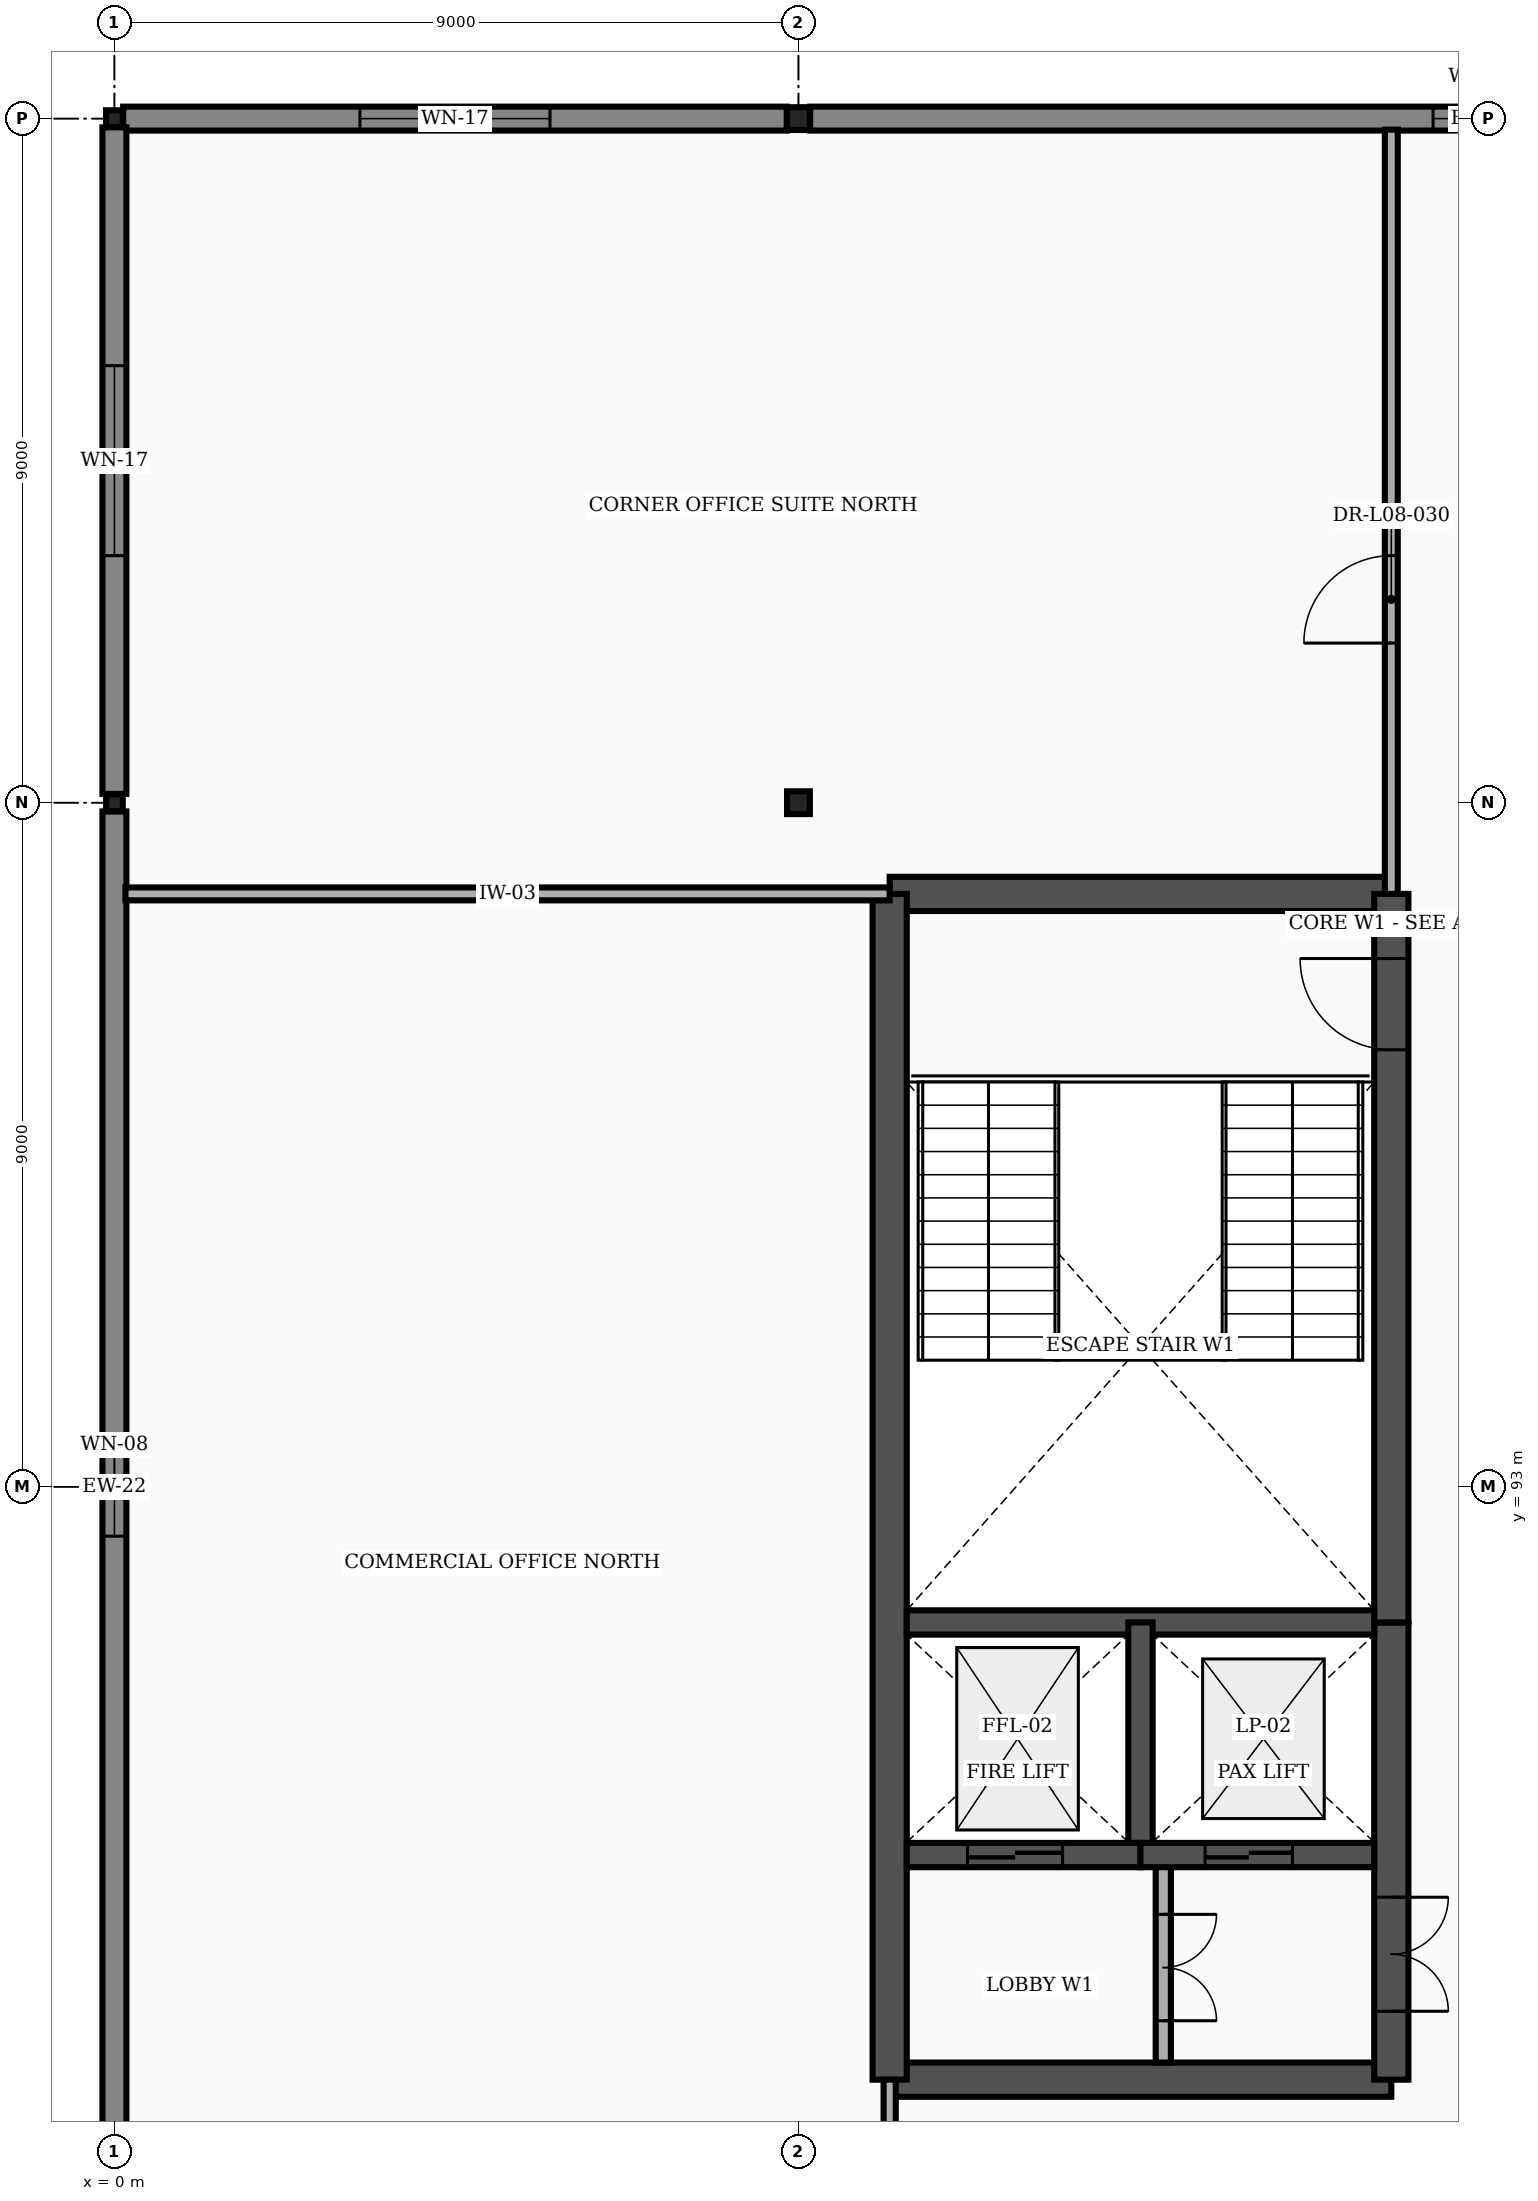
"""IFC4 building model, lengths in metres.
Left out: names, types, materials, properties, quantities, classifications, styles, units other than length and angle.
Written with IfcOpenShell. Run it as: python <this file> out.ifc"""

import sys

from ifc_helpers import new_model, si_unit, direction, frame, frame_2d, origin, origin_2d, place, context, subcontext, project, spatial, rectangle, hollow_rectangle, extrude, element, fill, save


model = new_model("IFC4")
c1 = context("Model", 3, precision=1e-05, world=origin(), true_north=direction((0.0, 1.0)))
c2 = subcontext(c1, "Body", "Model", "MODEL_VIEW")
j1 = project(units=[si_unit("LENGTHUNIT", "METRE"), si_unit("PLANEANGLEUNIT", "RADIAN")], contexts=[c1])
p1 = place(None, origin())
s1 = spatial("IfcSite", under=j1, at=p1, CompositionType="ELEMENT")
p2 = place(p1, origin())
s2 = spatial("IfcBuilding", under=s1, at=p2, CompositionType="ELEMENT")
p3 = place(p2, frame((0.0, 0.0, 37.8)))
s3 = spatial("IfcBuildingStorey", under=s2, at=p3, CompositionType="ELEMENT", Elevation=37.8)
for number, where, z_axis, x_axis in (
    (1, (0.0, 102.0, 0.0), (0.0, 0.0, 1.0), (1.0, 0.0, 0.0)),
    (2, (0.0, 111.0, 0.0), (0.0, 0.0, 1.0), (1.0, 0.0, 0.0)),
):
    element("IfcColumn", number, at=place(p3, frame(where, z_axis=z_axis, x_axis=x_axis)), inside=s3, PredefinedType="COLUMN", context=c2, shape_type="SweptSolid", body=[
        extrude(hollow_rectangle(XDim=0.22, YDim=0.22, WallThickness=0.01, at=origin_2d()), origin(), (0.0, 0.0, 1.0), 3.9),
    ])
for number, where, z_axis, x_axis in (
    (3, (9.0, 102.0, 0.0), (0.0, 0.0, 1.0), (1.0, 0.0, 0.0)),
    (4, (9.0, 111.0, 0.0), (0.0, 0.0, 1.0), (1.0, 0.0, 0.0)),
):
    element("IfcColumn", number, at=place(p3, frame(where, z_axis=z_axis, x_axis=x_axis)), inside=s3, PredefinedType="COLUMN", context=c2, shape_type="SweptSolid", body=[
        extrude(hollow_rectangle(XDim=0.3, YDim=0.3, WallThickness=0.012, at=origin_2d()), origin(), (0.0, 0.0, 1.0), 3.9),
    ])
p4 = place(p3, frame((0.115, 111.0, 0.0), z_axis=(0.0, 0.0, 1.0), x_axis=(1.0, 0.0, 0.0)))
e5 = element("IfcWall", 5, at=p4, inside=s3, PredefinedType="STANDARD", context=c2, shape_type="SweptSolid", body=[
    extrude(rectangle(XDim=8.731, YDim=0.315, at=frame_2d((4.366, 0.0))), origin(), (0.0, 0.0, 1.0), 3.565),
])
p5 = place(p4, frame((3.115, 0.0, 0.7)))
e6 = element("IfcOpeningElement", 6, at=p5, cuts=e5, PredefinedType="OPENING", context=c2, shape_type="SweptSolid", body=[
    extrude(rectangle(XDim=2.5, YDim=1.9, at=frame_2d((1.25, 0.95))), frame((0.0, 0.169, 0.0), z_axis=(0.0, -1.0, 0.0), x_axis=(1.0, 0.0, 0.0)), (0.0, 0.0, 1.0), 0.339),
])
p6 = place(p3, frame((9.154, 111.0, 0.0), z_axis=(0.0, 0.0, 1.0), x_axis=(1.0, 0.0, 0.0)))
e7 = element("IfcWall", 7, at=p6, inside=s3, PredefinedType="STANDARD", context=c2, shape_type="SweptSolid", body=[
    extrude(rectangle(XDim=17.692, YDim=0.315, at=frame_2d((8.846, 0.0))), origin(), (0.0, 0.0, 1.0), 2.803),
])
p7 = place(p6, frame((8.196, 0.0, 0.7)))
e8 = element("IfcOpeningElement", 8, at=p7, cuts=e7, PredefinedType="OPENING", context=c2, shape_type="SweptSolid", body=[
    extrude(rectangle(XDim=1.3, YDim=1.9, at=frame_2d((0.65, 0.95))), frame((0.0, 0.169, 0.0), z_axis=(0.0, -1.0, 0.0), x_axis=(1.0, 0.0, 0.0)), (0.0, 0.0, 1.0), 0.339),
])
p8 = place(p3, frame((0.0, 84.115, 0.0), z_axis=(0.0, 0.0, 1.0), x_axis=(0.0, 1.0, 0.0)))
e9 = element("IfcWall", 9, at=p8, inside=s3, PredefinedType="STANDARD", context=c2, shape_type="SweptSolid", body=[
    extrude(rectangle(XDim=17.77, YDim=0.315, at=frame_2d((8.885, 0.0))), origin(), (0.0, 0.0, 1.0), 2.953),
])
p9 = place(p8, frame((8.235, 0.0, 0.7)))
e10 = element("IfcOpeningElement", 10, at=p9, cuts=e9, PredefinedType="OPENING", context=c2, shape_type="SweptSolid", body=[
    extrude(rectangle(XDim=1.3, YDim=1.9, at=frame_2d((0.65, 0.95))), frame((0.0, 0.169, 0.0), z_axis=(0.0, -1.0, 0.0), x_axis=(1.0, 0.0, 0.0)), (0.0, 0.0, 1.0), 0.339),
])
p10 = place(p3, frame((0.0, 102.115, 0.0), z_axis=(0.0, 0.0, 1.0), x_axis=(0.0, 1.0, 0.0)))
e11 = element("IfcWall", 11, at=p10, inside=s3, PredefinedType="STANDARD", context=c2, shape_type="SweptSolid", body=[
    extrude(rectangle(XDim=8.77, YDim=0.315, at=frame_2d((4.385, 0.0))), origin(), (0.0, 0.0, 1.0), 3.565),
])
p11 = place(p10, frame((3.135, 0.0, 0.7)))
e12 = element("IfcOpeningElement", 12, at=p11, cuts=e11, PredefinedType="OPENING", context=c2, shape_type="SweptSolid", body=[
    extrude(rectangle(XDim=2.5, YDim=1.9, at=frame_2d((1.25, 0.95))), frame((0.0, 0.169, 0.0), z_axis=(0.0, -1.0, 0.0), x_axis=(1.0, 0.0, 0.0)), (0.0, 0.0, 1.0), 0.339),
])
for number, where, z_axis, x_axis in (
    (13, (10.2, 85.2, 0.0), (0.0, 0.0, 1.0), (1.0, 0.0, 0.0)),
    (14, (10.2, 100.8, 0.0), (0.0, 0.0, 1.0), (1.0, 0.0, 0.0)),
):
    element("IfcWall", number, at=place(p3, frame(where, z_axis=z_axis, x_axis=x_axis)), inside=s3, PredefinedType="SHEAR", context=c2, shape_type="SweptSolid", body=[
        extrude(rectangle(XDim=6.6, YDim=0.45, at=frame_2d((3.3, 0.0))), origin(), (0.0, 0.0, 1.0), 3.565),
    ])
p12 = place(p3, frame((10.2, 85.2, 0.0), z_axis=(0.0, 0.0, 1.0), x_axis=(0.0, 1.0, 0.0)))
e15 = element("IfcWall", 15, at=p12, inside=s3, PredefinedType="SHEAR", context=c2, shape_type="SweptSolid", body=[
    extrude(rectangle(XDim=15.6, YDim=0.45, at=frame_2d((7.8, 0.0))), origin(), (0.0, 0.0, 1.0), 3.565),
])
p13 = place(p3, frame((16.8, 85.2, 0.0), z_axis=(0.0, 0.0, 1.0), x_axis=(0.0, 1.0, 0.0)))
e16 = element("IfcWall", 16, at=p13, inside=s3, PredefinedType="SHEAR", context=c2, shape_type="SweptSolid", body=[
    extrude(rectangle(XDim=6.015, YDim=0.45, at=frame_2d((3.008, 0.0))), origin(), (0.0, 0.0, 1.0), 3.565),
])
p14 = place(p13, frame((0.9, 0.0, 0.0)))
e17 = element("IfcOpeningElement", 17, at=p14, cuts=e16, PredefinedType="OPENING", context=c2, shape_type="SweptSolid", body=[
    extrude(rectangle(XDim=1.5, YDim=2.2, at=frame_2d((0.75, 1.1))), frame((0.0, 0.237, 0.0), z_axis=(0.0, -1.0, 0.0), x_axis=(1.0, 0.0, 0.0)), (0.0, 0.0, 1.0), 0.474),
])
p15 = place(p3, frame((16.8, 91.215, 0.0), z_axis=(0.0, 0.0, 1.0), x_axis=(0.0, 1.0, 0.0)))
e18 = element("IfcWall", 18, at=p15, inside=s3, PredefinedType="SHEAR", context=c2, shape_type="SweptSolid", body=[
    extrude(rectangle(XDim=9.585, YDim=0.45, at=frame_2d((4.792, 0.0))), origin(), (0.0, 0.0, 1.0), 3.565),
])
p16 = place(p15, frame((7.535, 0.0, 0.0)))
e19 = element("IfcOpeningElement", 19, at=p16, cuts=e18, PredefinedType="OPENING", context=c2, shape_type="SweptSolid", body=[
    extrude(rectangle(XDim=1.2, YDim=2.2, at=frame_2d((0.6, 1.1))), frame((0.0, 0.237, 0.0), z_axis=(0.0, -1.0, 0.0), x_axis=(1.0, 0.0, 0.0)), (0.0, 0.0, 1.0), 0.474),
])
p17 = place(p3, frame((10.425, 91.215, 0.0), z_axis=(0.0, 0.0, 1.0), x_axis=(1.0, 0.0, 0.0)))
e20 = element("IfcWall", 20, at=p17, inside=s3, PredefinedType="SHEAR", context=c2, shape_type="SweptSolid", body=[
    extrude(rectangle(XDim=6.15, YDim=0.32, at=frame_2d((3.075, 0.0))), origin(), (0.0, 0.0, 1.0), 3.565),
])
p18 = place(p3, frame((13.5, 88.155, 0.0), z_axis=(0.0, 0.0, 1.0), x_axis=(0.0, 1.0, 0.0)))
e21 = element("IfcWall", 21, at=p18, inside=s3, PredefinedType="SHEAR", context=c2, shape_type="SweptSolid", body=[
    extrude(rectangle(XDim=3.06, YDim=0.32, at=frame_2d((1.53, 0.0))), origin(), (0.0, 0.0, 1.0), 3.565),
])
p19 = place(p3, frame((13.8, 85.425, 0.0), z_axis=(0.0, 0.0, 1.0), x_axis=(0.0, 1.0, 0.0)))
e22 = element("IfcWall", 22, at=p19, inside=s3, PredefinedType="PARTITIONING", context=c2, shape_type="SweptSolid", body=[
    extrude(rectangle(XDim=2.73, YDim=0.2, at=frame_2d((1.365, 0.0))), origin(), (0.0, 0.0, 1.0), 3.565),
])
p20 = place(p19, frame((0.55, 0.0, 0.0)))
e23 = element("IfcOpeningElement", 23, at=p20, cuts=e22, PredefinedType="OPENING", context=c2, shape_type="SweptSolid", body=[
    extrude(rectangle(XDim=1.4, YDim=2.25, at=frame_2d((0.7, 1.125))), frame((0.0, 0.112, 0.0), z_axis=(0.0, -1.0, 0.0), x_axis=(1.0, 0.0, 0.0)), (0.0, 0.0, 1.0), 0.224),
])
p21 = place(p3, frame((10.425, 88.155, 0.0), z_axis=(0.0, 0.0, 1.0), x_axis=(1.0, 0.0, 0.0)))
e24 = element("IfcWall", 24, at=p21, inside=s3, PredefinedType="SHEAR", context=c2, shape_type="SweptSolid", body=[
    extrude(rectangle(XDim=3.075, YDim=0.32, at=frame_2d((1.538, 0.0))), origin(), (0.0, 0.0, 1.0), 3.565),
])
p22 = place(p21, frame((0.8, 0.0, 0.0)))
e25 = element("IfcOpeningElement", 25, at=p22, cuts=e24, PredefinedType="OPENING", context=c2, shape_type="SweptSolid", body=[
    extrude(rectangle(XDim=1.25, YDim=2.25, at=frame_2d((0.625, 1.125))), frame((0.0, 0.172, 0.0), z_axis=(0.0, -1.0, 0.0), x_axis=(1.0, 0.0, 0.0)), (0.0, 0.0, 1.0), 0.344),
])
p23 = place(p3, frame((13.5, 88.155, 0.0), z_axis=(0.0, 0.0, 1.0), x_axis=(1.0, 0.0, 0.0)))
e26 = element("IfcWall", 26, at=p23, inside=s3, PredefinedType="SHEAR", context=c2, shape_type="SweptSolid", body=[
    extrude(rectangle(XDim=3.075, YDim=0.32, at=frame_2d((1.538, 0.0))), origin(), (0.0, 0.0, 1.0), 3.565),
])
p24 = place(p23, frame((0.85, 0.0, 0.0)))
e27 = element("IfcOpeningElement", 27, at=p24, cuts=e26, PredefinedType="OPENING", context=c2, shape_type="SweptSolid", body=[
    extrude(rectangle(XDim=1.15, YDim=2.2, at=frame_2d((0.575, 1.1))), frame((0.0, 0.172, 0.0), z_axis=(0.0, -1.0, 0.0), x_axis=(1.0, 0.0, 0.0)), (0.0, 0.0, 1.0), 0.344),
])
p25 = place(p3, frame((10.2, 83.2, 0.0), z_axis=(0.0, 0.0, 1.0), x_axis=(0.0, 1.0, 0.0)))
e28 = element("IfcWall", 28, at=p25, inside=s3, PredefinedType="PARTITIONING", context=c2, shape_type="SweptSolid", body=[
    extrude(rectangle(XDim=2.0, YDim=0.16, at=frame_2d((1.0, 0.0))), origin(), (0.0, 0.0, 1.0), 3.565),
])
p26 = place(p3, frame((0.145, 100.8, 0.0), z_axis=(0.0, 0.0, 1.0), x_axis=(1.0, 0.0, 0.0)))
e29 = element("IfcWall", 29, at=p26, inside=s3, PredefinedType="PARTITIONING", context=c2, shape_type="SweptSolid", body=[
    extrude(rectangle(XDim=10.055, YDim=0.17, at=frame_2d((5.027, 0.0))), origin(), (0.0, 0.0, 1.0), 3.565),
])
p27 = place(p3, frame((16.8, 100.8, 0.0), z_axis=(0.0, 0.0, 1.0), x_axis=(0.0, 1.0, 0.0)))
e30 = element("IfcWall", 30, at=p27, inside=s3, PredefinedType="PARTITIONING", context=c2, shape_type="SweptSolid", body=[
    extrude(rectangle(XDim=10.055, YDim=0.17, at=frame_2d((5.027, 0.0))), origin(), (0.0, 0.0, 1.0), 3.565),
])
p28 = place(p27, frame((3.3, 0.0, 0.0)))
e31 = element("IfcOpeningElement", 31, at=p28, cuts=e30, PredefinedType="OPENING", context=c2, shape_type="SweptSolid", body=[
    extrude(rectangle(XDim=1.15, YDim=2.15, at=frame_2d((0.575, 1.075))), frame((0.0, 0.097, 0.0), z_axis=(0.0, -1.0, 0.0), x_axis=(1.0, 0.0, 0.0)), (0.0, 0.0, 1.0), 0.194),
])
p29 = place(p5, origin())
e32 = element("IfcWindow", 32, at=p29, inside=s3, PartitioningType="SINGLE_PANEL", PredefinedType="WINDOW", context=c2, shape_type="SweptSolid", body=[
    extrude(rectangle(XDim=2.5, YDim=1.9, at=frame_2d((1.25, 0.95))), frame((0.0, 0.03, 0.0), z_axis=(0.0, -1.0, 0.0), x_axis=(1.0, 0.0, 0.0)), (0.0, 0.0, 1.0), 0.06),
])
fill(e6, e32)
p30 = place(p7, origin())
e33 = element("IfcWindow", 33, at=p30, inside=s3, PartitioningType="SINGLE_PANEL", PredefinedType="WINDOW", context=c2, shape_type="SweptSolid", body=[
    extrude(rectangle(XDim=1.3, YDim=1.9, at=frame_2d((0.65, 0.95))), frame((0.0, 0.03, 0.0), z_axis=(0.0, -1.0, 0.0), x_axis=(1.0, 0.0, 0.0)), (0.0, 0.0, 1.0), 0.06),
])
fill(e8, e33)
p31 = place(p9, origin())
e34 = element("IfcWindow", 34, at=p31, inside=s3, PartitioningType="SINGLE_PANEL", PredefinedType="WINDOW", context=c2, shape_type="SweptSolid", body=[
    extrude(rectangle(XDim=1.3, YDim=1.9, at=frame_2d((0.65, 0.95))), frame((0.0, 0.03, 0.0), z_axis=(0.0, -1.0, 0.0), x_axis=(1.0, 0.0, 0.0)), (0.0, 0.0, 1.0), 0.06),
])
fill(e10, e34)
p32 = place(p11, origin())
e35 = element("IfcWindow", 35, at=p32, inside=s3, PartitioningType="SINGLE_PANEL", PredefinedType="WINDOW", context=c2, shape_type="SweptSolid", body=[
    extrude(rectangle(XDim=2.5, YDim=1.9, at=frame_2d((1.25, 0.95))), frame((0.0, 0.03, 0.0), z_axis=(0.0, -1.0, 0.0), x_axis=(1.0, 0.0, 0.0)), (0.0, 0.0, 1.0), 0.06),
])
fill(e12, e35)
p33 = place(p14, frame((1.5, 0.0, 0.0), z_axis=(0.0, 0.0, 1.0), x_axis=(-1.0, 0.0, 0.0)))
e36 = element("IfcDoor", 36, at=p33, inside=s3, OperationType="DOUBLE_DOOR_SINGLE_SWING", PredefinedType="DOOR", context=c2, shape_type="SweptSolid", body=[
    extrude(rectangle(XDim=1.5, YDim=2.2, at=frame_2d((0.75, 1.1))), frame((0.0, 0.025, 0.0), z_axis=(0.0, -1.0, 0.0), x_axis=(1.0, 0.0, 0.0)), (0.0, 0.0, 1.0), 0.05),
])
fill(e17, e36)
p34 = place(p16, origin())
e37 = element("IfcDoor", 37, at=p34, inside=s3, OperationType="SINGLE_SWING_RIGHT", PredefinedType="DOOR", context=c2, shape_type="SweptSolid", body=[
    extrude(rectangle(XDim=1.2, YDim=2.2, at=frame_2d((0.6, 1.1))), frame((0.0, 0.025, 0.0), z_axis=(0.0, -1.0, 0.0), x_axis=(1.0, 0.0, 0.0)), (0.0, 0.0, 1.0), 0.05),
])
fill(e19, e37)
p35 = place(p20, frame((1.4, 0.0, 0.0), z_axis=(0.0, 0.0, 1.0), x_axis=(-1.0, 0.0, 0.0)))
e38 = element("IfcDoor", 38, at=p35, inside=s3, OperationType="DOUBLE_DOOR_SINGLE_SWING", PredefinedType="DOOR", context=c2, shape_type="SweptSolid", body=[
    extrude(rectangle(XDim=1.4, YDim=2.25, at=frame_2d((0.7, 1.125))), frame((0.0, 0.025, 0.0), z_axis=(0.0, -1.0, 0.0), x_axis=(1.0, 0.0, 0.0)), (0.0, 0.0, 1.0), 0.05),
])
fill(e23, e38)
p36 = place(p22, origin())
e39 = element("IfcDoor", 39, at=p36, inside=s3, OperationType="DOUBLE_DOOR_SLIDING", PredefinedType="DOOR", context=c2, shape_type="SweptSolid", body=[
    extrude(rectangle(XDim=1.25, YDim=2.25, at=frame_2d((0.625, 1.125))), frame((0.0, 0.025, 0.0), z_axis=(0.0, -1.0, 0.0), x_axis=(1.0, 0.0, 0.0)), (0.0, 0.0, 1.0), 0.05),
])
fill(e25, e39)
p37 = place(p24, origin())
e40 = element("IfcDoor", 40, at=p37, inside=s3, OperationType="DOUBLE_DOOR_SLIDING", PredefinedType="DOOR", context=c2, shape_type="SweptSolid", body=[
    extrude(rectangle(XDim=1.15, YDim=2.2, at=frame_2d((0.575, 1.1))), frame((0.0, 0.025, 0.0), z_axis=(0.0, -1.0, 0.0), x_axis=(1.0, 0.0, 0.0)), (0.0, 0.0, 1.0), 0.05),
])
fill(e27, e40)
p38 = place(p28, origin())
e41 = element("IfcDoor", 41, at=p38, inside=s3, OperationType="SINGLE_SWING_LEFT", PredefinedType="DOOR", context=c2, shape_type="SweptSolid", body=[
    extrude(rectangle(XDim=1.15, YDim=2.15, at=frame_2d((0.575, 1.075))), frame((0.0, 0.025, 0.0), z_axis=(0.0, -1.0, 0.0), x_axis=(1.0, 0.0, 0.0)), (0.0, 0.0, 1.0), 0.05),
])
fill(e31, e41)
save(model, sys.argv[1])
